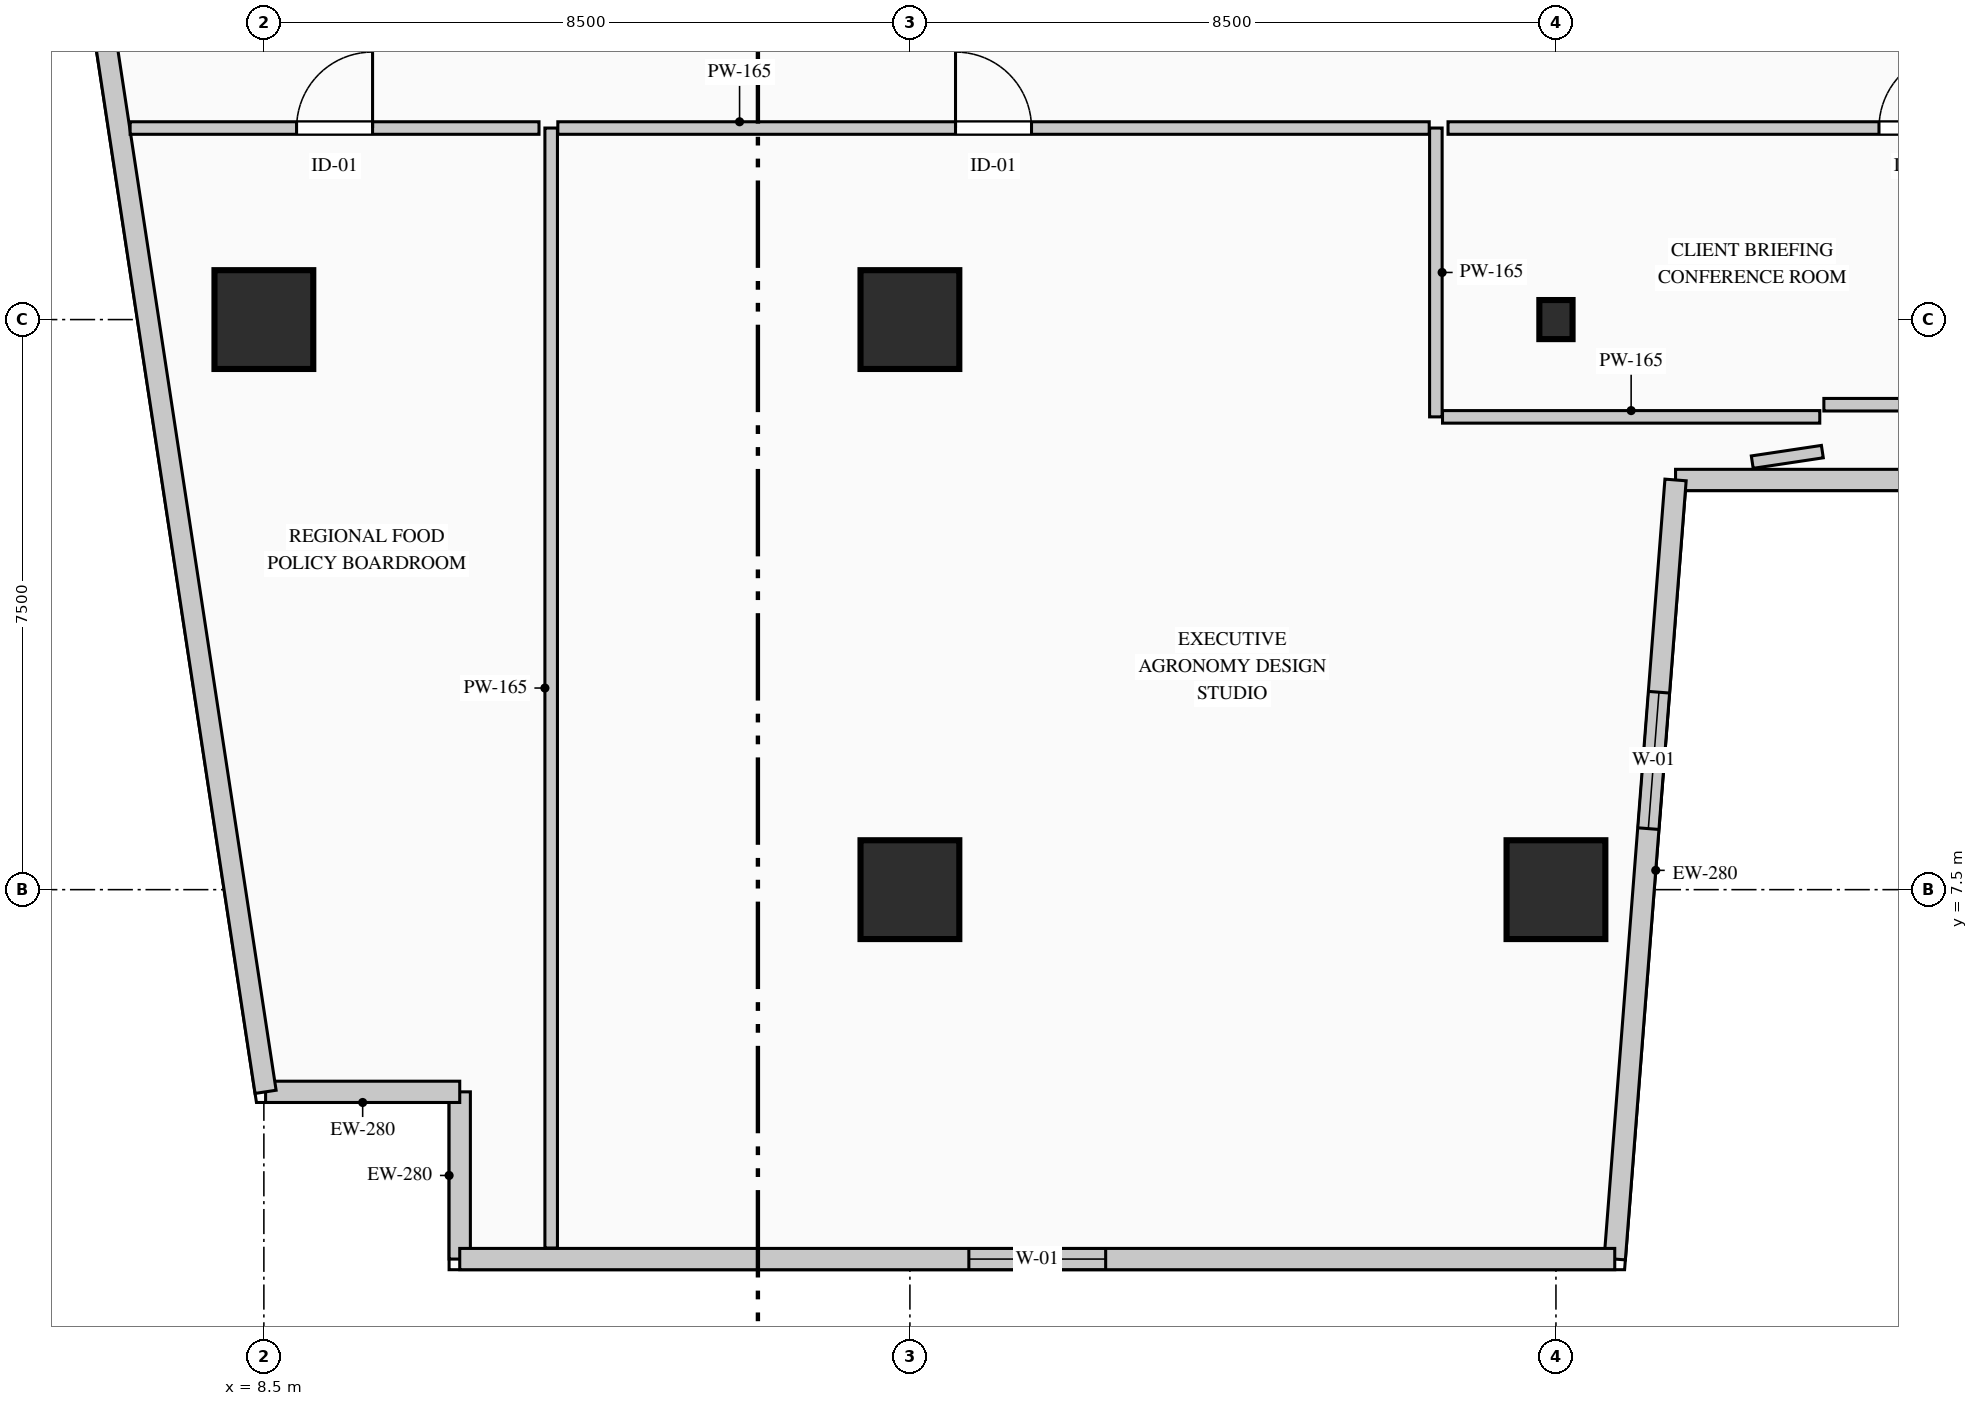
"""IFC4 building model, lengths in metres.
Left out: names, types, materials, properties, quantities, classifications, styles, units other than length and angle.
Written with IfcOpenShell. Run it as: python <this file> out.ifc"""

import sys

from ifc_helpers import new_model, si_unit, direction, frame, frame_2d, origin, origin_2d, place, context, subcontext, project, spatial, rectangle, i_section, extrude, element, fill, save


model = new_model("IFC4")
c1 = context("Model", 3, precision=1e-05, world=origin(), true_north=direction((0.0, 1.0)))
c2 = subcontext(c1, "Body", "Model", "MODEL_VIEW")
j1 = project(units=[si_unit("LENGTHUNIT", "METRE"), si_unit("PLANEANGLEUNIT", "RADIAN")], contexts=[c1])
p1 = place(None, origin())
s1 = spatial("IfcSite", under=j1, at=p1, CompositionType="ELEMENT")
p2 = place(p1, origin())
s2 = spatial("IfcBuilding", under=s1, at=p2, CompositionType="ELEMENT")
p3 = place(p2, frame((0.0, 0.0, 97.4)))
s3 = spatial("IfcBuildingStorey", under=s2, at=p3, CompositionType="ELEMENT", Elevation=97.4)
for number, where, z_axis, x_axis in (
    (1, (8.5, 15.0, 0.0), (0.0, 0.0, 1.0), (1.0, 0.0, 0.0)),
    (2, (17.0, 7.5, 0.0), (0.0, 0.0, 1.0), (1.0, 0.0, 0.0)),
    (3, (17.0, 15.0, 0.0), (0.0, 0.0, 1.0), (1.0, 0.0, 0.0)),
    (4, (25.5, 7.5, 0.0), (0.0, 0.0, 1.0), (1.0, 0.0, 0.0)),
):
    element("IfcColumn", number, at=place(p3, frame(where, z_axis=z_axis, x_axis=x_axis)), inside=s3, PredefinedType="COLUMN", context=c2, shape_type="SweptSolid", body=[
        extrude(rectangle(XDim=1.3, YDim=1.3, at=origin_2d()), origin(), (0.0, 0.0, 1.0), 4.4),
    ])
p4 = place(p3, frame((25.5, 15.0, 0.0), z_axis=(0.0, 0.0, 1.0), x_axis=(1.0, 0.0, 0.0)))
e5 = element("IfcColumn", 5, at=p4, inside=s3, PredefinedType="COLUMN", context=c2, shape_type="SweptSolid", body=[
    extrude(i_section(OverallWidth=0.437, OverallDepth=0.514, WebThickness=0.061, FlangeThickness=0.077, FilletRadius=0.015, at=origin_2d()), origin(), (0.0, 0.0, 1.0), 4.4),
])
p5 = place(p3, frame((11.077, 2.64, 0.0), z_axis=(0.0, 0.0, 1.0), x_axis=(0.0, 1.0, 0.0)))
e6 = element("IfcWall", 6, at=p5, inside=s3, PredefinedType="STANDARD", context=c2, shape_type="SweptSolid", body=[
    extrude(rectangle(XDim=2.2, YDim=0.28, at=frame_2d((1.1, 0.0))), origin(), (0.0, 0.0, 1.0), 4.115),
])
p6 = place(p3, frame((11.077, 4.84, 0.0), z_axis=(0.0, 0.0, 1.0), x_axis=(-1.0, 0.0, 0.0)))
e7 = element("IfcWall", 7, at=p6, inside=s3, PredefinedType="STANDARD", context=c2, shape_type="SweptSolid", body=[
    extrude(rectangle(XDim=2.554, YDim=0.28, at=frame_2d((1.277, 0.0))), origin(), (0.0, 0.0, 1.0), 4.115),
])
p7 = place(p3, frame((8.523, 4.84, 0.0), z_axis=(0.0, 0.0, 1.0), x_axis=(-0.150394554312, 0.988626055712, 0.0)))
e8 = element("IfcWall", 8, at=p7, inside=s3, PredefinedType="STANDARD", context=c2, shape_type="SweptSolid", body=[
    extrude(rectangle(XDim=36.738, YDim=0.28, at=frame_2d((18.369, 0.0))), origin(), (0.0, 0.0, 1.0), 4.115),
])
p8 = place(p7, frame((22.612, 0.0, 0.9)))
e9 = element("IfcOpeningElement", 9, at=p8, cuts=e8, PredefinedType="OPENING", context=c2, shape_type="SweptSolid", body=[
    extrude(rectangle(XDim=1.8, YDim=2.1, at=frame_2d((0.9, 1.05))), frame((0.0, 0.15, 0.0), z_axis=(0.0, -1.0, 0.0), x_axis=(1.0, 0.0, 0.0)), (0.0, 0.0, 1.0), 0.3),
])
p9 = place(p3, frame((35.77, 12.89, 0.0), z_axis=(0.0, 0.0, 1.0), x_axis=(-1.0, 0.0, 0.0)))
e10 = element("IfcWall", 10, at=p9, inside=s3, PredefinedType="STANDARD", context=c2, shape_type="SweptSolid", body=[
    extrude(rectangle(XDim=8.697, YDim=0.28, at=frame_2d((4.348, 0.0))), origin(), (0.0, 0.0, 1.0), 4.115),
])
p10 = place(p9, frame((3.448, 0.0, 0.9)))
e11 = element("IfcOpeningElement", 11, at=p10, cuts=e10, PredefinedType="OPENING", context=c2, shape_type="SweptSolid", body=[
    extrude(rectangle(XDim=1.8, YDim=2.1, at=frame_2d((0.9, 1.05))), frame((0.0, 0.15, 0.0), z_axis=(0.0, -1.0, 0.0), x_axis=(1.0, 0.0, 0.0)), (0.0, 0.0, 1.0), 0.3),
])
p11 = place(p3, frame((27.073, 12.89, 0.0), z_axis=(0.0, 0.0, 1.0), x_axis=(-0.077816860153, -0.996967670627, 0.0)))
e12 = element("IfcWall", 12, at=p11, inside=s3, PredefinedType="STANDARD", context=c2, shape_type="SweptSolid", body=[
    extrude(rectangle(XDim=10.281, YDim=0.28, at=frame_2d((5.141, 0.0))), origin(), (0.0, 0.0, 1.0), 4.115),
])
p12 = place(p11, frame((2.801, 0.0, 0.9)))
e13 = element("IfcOpeningElement", 13, at=p12, cuts=e12, PredefinedType="OPENING", context=c2, shape_type="SweptSolid", body=[
    extrude(rectangle(XDim=1.8, YDim=2.1, at=frame_2d((0.9, 1.05))), frame((0.0, 0.15, 0.0), z_axis=(0.0, -1.0, 0.0), x_axis=(1.0, 0.0, 0.0)), (0.0, 0.0, 1.0), 0.3),
])
p13 = place(p3, frame((26.273, 2.64, 0.0), z_axis=(0.0, 0.0, 1.0), x_axis=(-1.0, 0.0, 0.0)))
e14 = element("IfcWall", 14, at=p13, inside=s3, PredefinedType="STANDARD", context=c2, shape_type="SweptSolid", body=[
    extrude(rectangle(XDim=15.197, YDim=0.28, at=frame_2d((7.598, 0.0))), origin(), (0.0, 0.0, 1.0), 4.115),
])
p14 = place(p13, frame((6.698, 0.0, 0.9)))
e15 = element("IfcOpeningElement", 15, at=p14, cuts=e14, PredefinedType="OPENING", context=c2, shape_type="SweptSolid", body=[
    extrude(rectangle(XDim=1.8, YDim=2.1, at=frame_2d((0.9, 1.05))), frame((0.0, 0.15, 0.0), z_axis=(0.0, -1.0, 0.0), x_axis=(1.0, 0.0, 0.0)), (0.0, 0.0, 1.0), 0.3),
])
p15 = place(p3, frame((23.92, 17.52, 0.0), z_axis=(0.0, 0.0, 1.0), x_axis=(0.0, -1.0, 0.0)))
e16 = element("IfcWall", 16, at=p15, inside=s3, PredefinedType="PARTITIONING", context=c2, shape_type="SweptSolid", body=[
    extrude(rectangle(XDim=3.8, YDim=0.165, at=frame_2d((1.9, 0.0))), origin(), (0.0, 0.0, 1.0), 3.7),
])
p16 = place(p3, frame((24.008, 13.72, 0.0), z_axis=(0.0, 0.0, 1.0), x_axis=(1.0, 0.0, 0.0)))
e17 = element("IfcWall", 17, at=p16, inside=s3, PredefinedType="PARTITIONING", context=c2, shape_type="SweptSolid", body=[
    extrude(rectangle(XDim=4.963, YDim=0.165, at=frame_2d((2.482, 0.0))), origin(), (0.0, 0.0, 1.0), 4.115),
])
p17 = place(p3, frame((29.005, 13.263, 0.0), z_axis=(0.0, 0.0, 1.0), x_axis=(-0.988919061759, -0.148455681233, 0.0)))
e18 = element("IfcWall", 18, at=p17, inside=s3, PredefinedType="PARTITIONING", context=c2, shape_type="SweptSolid", body=[
    extrude(rectangle(XDim=0.932, YDim=0.165, at=frame_2d((0.466, 0.0))), origin(), (0.0, 0.0, 1.0), 4.115),
])
p18 = place(p3, frame((12.28, 2.785, 0.0), z_axis=(0.0, 0.0, 1.0), x_axis=(0.0, 1.0, 0.0)))
e19 = element("IfcWall", 19, at=p18, inside=s3, PredefinedType="PARTITIONING", context=c2, shape_type="SweptSolid", body=[
    extrude(rectangle(XDim=14.735, YDim=0.165, at=frame_2d((7.368, 0.0))), origin(), (0.0, 0.0, 1.0), 4.115),
])
p19 = place(p3, frame((12.367, 17.52, 0.0), z_axis=(0.0, 0.0, 1.0), x_axis=(1.0, 0.0, 0.0)))
e20 = element("IfcWall", 20, at=p19, inside=s3, PredefinedType="PARTITIONING", context=c2, shape_type="SweptSolid", body=[
    extrude(rectangle(XDim=11.465, YDim=0.165, at=frame_2d((5.732, 0.0))), origin(), (0.0, 0.0, 1.0), 4.115),
])
p20 = place(p19, frame((5.232, 0.0, 0.0)))
e21 = element("IfcOpeningElement", 21, at=p20, cuts=e20, PredefinedType="OPENING", context=c2, shape_type="SweptSolid", body=[
    extrude(rectangle(XDim=1.0, YDim=2.15, at=frame_2d((0.5, 1.075))), frame((0.0, 0.093, 0.0), z_axis=(0.0, -1.0, 0.0), x_axis=(1.0, 0.0, 0.0)), (0.0, 0.0, 1.0), 0.185),
])
p21 = place(p3, frame((6.74, 17.52, 0.0), z_axis=(0.0, 0.0, 1.0), x_axis=(1.0, 0.0, 0.0)))
e22 = element("IfcWall", 22, at=p21, inside=s3, PredefinedType="PARTITIONING", context=c2, shape_type="SweptSolid", body=[
    extrude(rectangle(XDim=5.38, YDim=0.165, at=frame_2d((2.69, 0.0))), origin(), (0.0, 0.0, 1.0), 4.115),
])
p22 = place(p21, frame((2.19, 0.0, 0.0)))
e23 = element("IfcOpeningElement", 23, at=p22, cuts=e22, PredefinedType="OPENING", context=c2, shape_type="SweptSolid", body=[
    extrude(rectangle(XDim=1.0, YDim=2.15, at=frame_2d((0.5, 1.075))), frame((0.0, 0.093, 0.0), z_axis=(0.0, -1.0, 0.0), x_axis=(1.0, 0.0, 0.0)), (0.0, 0.0, 1.0), 0.185),
])
p23 = place(p3, frame((24.08, 17.52, 0.0), z_axis=(0.0, 0.0, 1.0), x_axis=(1.0, 0.0, 0.0)))
e24 = element("IfcWall", 24, at=p23, inside=s3, PredefinedType="PARTITIONING", context=c2, shape_type="SweptSolid", body=[
    extrude(rectangle(XDim=12.34, YDim=0.165, at=frame_2d((6.17, 0.0))), origin(), (0.0, 0.0, 1.0), 3.7),
])
p24 = place(p23, frame((5.67, 0.0, 0.0)))
e25 = element("IfcOpeningElement", 25, at=p24, cuts=e24, PredefinedType="OPENING", context=c2, shape_type="SweptSolid", body=[
    extrude(rectangle(XDim=1.0, YDim=2.15, at=frame_2d((0.5, 1.075))), frame((0.0, 0.093, 0.0), z_axis=(0.0, -1.0, 0.0), x_axis=(1.0, 0.0, 0.0)), (0.0, 0.0, 1.0), 0.185),
])
p25 = place(p3, frame((36.42, 13.88, 0.0), z_axis=(0.0, 0.0, 1.0), x_axis=(-1.0, 0.0, 0.0)))
e26 = element("IfcWall", 26, at=p25, inside=s3, PredefinedType="PARTITIONING", context=c2, shape_type="SweptSolid", body=[
    extrude(rectangle(XDim=7.395, YDim=0.165, at=frame_2d((3.698, 0.0))), origin(), (0.0, 0.0, 1.0), 4.115),
])
p26 = place(p12, origin())
e27 = element("IfcWindow", 27, at=p26, inside=s3, PartitioningType="SINGLE_PANEL", PredefinedType="WINDOW", context=c2, shape_type="SweptSolid", body=[
    extrude(rectangle(XDim=1.8, YDim=2.1, at=frame_2d((0.9, 1.05))), frame((0.0, 0.03, 0.0), z_axis=(0.0, -1.0, 0.0), x_axis=(1.0, 0.0, 0.0)), (0.0, 0.0, 1.0), 0.06),
])
fill(e13, e27)
p27 = place(p14, origin())
e28 = element("IfcWindow", 28, at=p27, inside=s3, PartitioningType="SINGLE_PANEL", PredefinedType="WINDOW", context=c2, shape_type="SweptSolid", body=[
    extrude(rectangle(XDim=1.8, YDim=2.1, at=frame_2d((0.9, 1.05))), frame((0.0, 0.03, 0.0), z_axis=(0.0, -1.0, 0.0), x_axis=(1.0, 0.0, 0.0)), (0.0, 0.0, 1.0), 0.06),
])
fill(e15, e28)
p28 = place(p20, origin())
e29 = element("IfcDoor", 29, at=p28, inside=s3, OperationType="SINGLE_SWING_LEFT", PredefinedType="DOOR", context=c2, shape_type="SweptSolid", body=[
    extrude(rectangle(XDim=1.0, YDim=2.15, at=frame_2d((0.5, 1.075))), frame((0.0, 0.025, 0.0), z_axis=(0.0, -1.0, 0.0), x_axis=(1.0, 0.0, 0.0)), (0.0, 0.0, 1.0), 0.05),
])
fill(e21, e29)
p29 = place(p22, origin())
e30 = element("IfcDoor", 30, at=p29, inside=s3, OperationType="SINGLE_SWING_RIGHT", PredefinedType="DOOR", context=c2, shape_type="SweptSolid", body=[
    extrude(rectangle(XDim=1.0, YDim=2.15, at=frame_2d((0.5, 1.075))), frame((0.0, 0.025, 0.0), z_axis=(0.0, -1.0, 0.0), x_axis=(1.0, 0.0, 0.0)), (0.0, 0.0, 1.0), 0.05),
])
fill(e23, e30)
p30 = place(p24, origin())
e31 = element("IfcDoor", 31, at=p30, inside=s3, OperationType="SINGLE_SWING_RIGHT", PredefinedType="DOOR", context=c2, shape_type="SweptSolid", body=[
    extrude(rectangle(XDim=1.0, YDim=2.15, at=frame_2d((0.5, 1.075))), frame((0.0, 0.025, 0.0), z_axis=(0.0, -1.0, 0.0), x_axis=(1.0, 0.0, 0.0)), (0.0, 0.0, 1.0), 0.05),
])
fill(e25, e31)
save(model, sys.argv[1])
